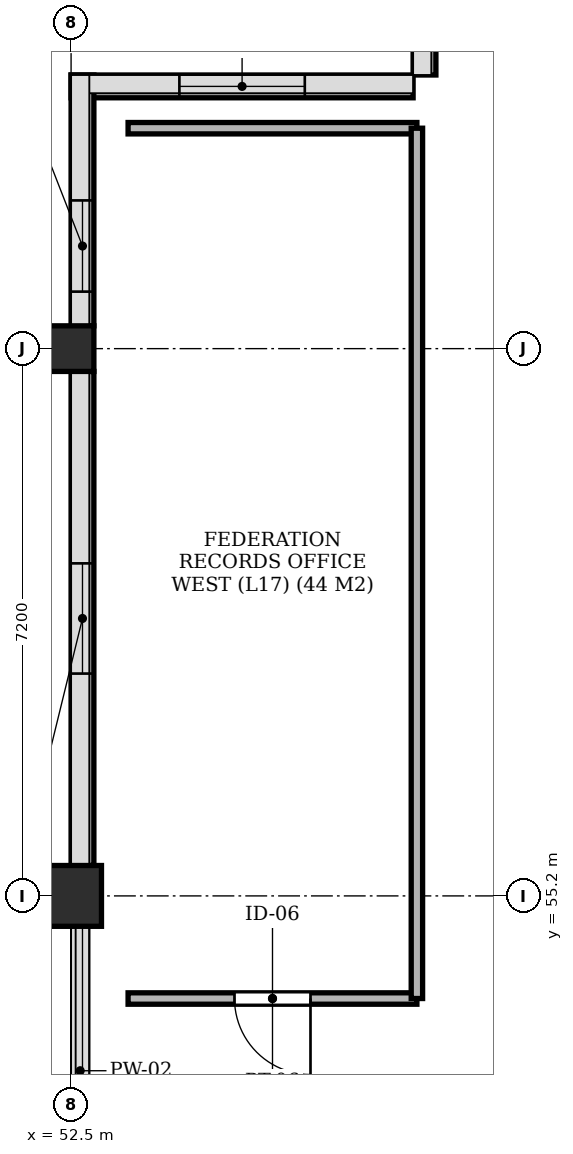
"""IFC4 building model, lengths in metres.
Left out: names, types, materials, properties, quantities, classifications, styles, units other than length and angle.
Written with IfcOpenShell. Run it as: python <this file> out.ifc"""

import sys

from ifc_helpers import new_model, si_unit, direction, frame, frame_2d, origin, origin_2d, place, context, subcontext, project, spatial, rectangle, extrude, element, fill, save


model = new_model("IFC4")
c1 = context("Model", 3, precision=1e-05, world=origin(), true_north=direction((0.0, 1.0)))
c2 = subcontext(c1, "Body", "Model", "MODEL_VIEW")
j1 = project(units=[si_unit("LENGTHUNIT", "METRE"), si_unit("PLANEANGLEUNIT", "RADIAN")], contexts=[c1])
p1 = place(None, origin())
s1 = spatial("IfcSite", under=j1, at=p1, CompositionType="ELEMENT")
p2 = place(p1, origin())
s2 = spatial("IfcBuilding", under=s1, at=p2, CompositionType="ELEMENT")
p3 = place(p2, frame((0.0, 0.0, 66.55)))
s3 = spatial("IfcBuildingStorey", under=s2, at=p3, CompositionType="ELEMENT", Elevation=66.55)
p4 = place(p3, frame((52.5, 55.2, -0.24), z_axis=(0.0, 0.0, 1.0), x_axis=(1.0, 0.0, 0.0)))
e1 = element("IfcColumn", 1, at=p4, inside=s3, PredefinedType="COLUMN", context=c2, shape_type="SweptSolid", body=[
    extrude(rectangle(XDim=0.8, YDim=0.8, at=origin_2d()), origin(), (0.0, 0.0, 1.0), 3.19),
])
p5 = place(p3, frame((52.5, 62.4, -0.24), z_axis=(0.0, 0.0, 1.0), x_axis=(1.0, 0.0, 0.0)))
e2 = element("IfcColumn", 2, at=p5, inside=s3, PredefinedType="COLUMN", context=c2, shape_type="SweptSolid", body=[
    extrude(rectangle(XDim=0.6, YDim=0.6, at=origin_2d()), origin(), (0.0, 0.0, 1.0), 3.19),
])
p6 = place(p3, frame((57.15, 69.6, 0.0), z_axis=(0.0, 0.0, 1.0), x_axis=(0.0, -1.0, 0.0)))
e3 = element("IfcWall", 3, at=p6, inside=s3, PredefinedType="SOLIDWALL", context=c2, shape_type="SweptSolid", body=[
    extrude(rectangle(XDim=3.6, YDim=0.3, at=frame_2d((1.8, 0.0))), origin(), (0.0, 0.0, 1.0), 2.53),
])
p7 = place(p3, frame((57.0, 65.85, 0.0), z_axis=(0.0, 0.0, 1.0), x_axis=(-1.0, 0.0, 0.0)))
e4 = element("IfcWall", 4, at=p7, inside=s3, PredefinedType="SOLIDWALL", context=c2, shape_type="SweptSolid", body=[
    extrude(rectangle(XDim=4.5, YDim=0.3, at=frame_2d((2.25, 0.0))), origin(), (0.0, 0.0, 1.0), 2.53),
])
p8 = place(p7, frame((1.425, 0.0, 0.62)))
e5 = element("IfcOpeningElement", 5, at=p8, cuts=e4, PredefinedType="OPENING", context=c2, shape_type="SweptSolid", body=[
    extrude(rectangle(XDim=1.65, YDim=1.81, at=frame_2d((0.825, 0.905))), frame((0.0, 0.162, 0.0), z_axis=(0.0, -1.0, 0.0), x_axis=(1.0, 0.0, 0.0)), (0.0, 0.0, 1.0), 0.324),
])
p9 = place(p3, frame((52.65, 66.0, 0.0), z_axis=(0.0, 0.0, 1.0), x_axis=(0.0, -1.0, 0.0)))
e6 = element("IfcWall", 6, at=p9, inside=s3, PredefinedType="SOLIDWALL", context=c2, shape_type="SweptSolid", body=[
    extrude(rectangle(XDim=3.3, YDim=0.3, at=frame_2d((1.65, 0.0))), origin(), (0.0, 0.0, 1.0), 2.53),
])
p10 = place(p9, frame((1.65, 0.0, 0.62)))
e7 = element("IfcOpeningElement", 7, at=p10, cuts=e6, PredefinedType="OPENING", context=c2, shape_type="SweptSolid", body=[
    extrude(rectangle(XDim=1.2, YDim=1.65, at=frame_2d((0.6, 0.825))), frame((0.0, 0.162, 0.0), z_axis=(0.0, -1.0, 0.0), x_axis=(1.0, 0.0, 0.0)), (0.0, 0.0, 1.0), 0.324),
])
p11 = place(p3, frame((52.65, 62.1, 0.0), z_axis=(0.0, 0.0, 1.0), x_axis=(0.0, -1.0, 0.0)))
e8 = element("IfcWall", 8, at=p11, inside=s3, PredefinedType="SOLIDWALL", context=c2, shape_type="SweptSolid", body=[
    extrude(rectangle(XDim=6.5, YDim=0.3, at=frame_2d((3.25, 0.0))), origin(), (0.0, 0.0, 1.0), 2.53),
])
p12 = place(p11, frame((2.525, 0.0, 0.62)))
e9 = element("IfcOpeningElement", 9, at=p12, cuts=e8, PredefinedType="OPENING", context=c2, shape_type="SweptSolid", body=[
    extrude(rectangle(XDim=1.45, YDim=1.81, at=frame_2d((0.725, 0.905))), frame((0.0, 0.162, 0.0), z_axis=(0.0, -1.0, 0.0), x_axis=(1.0, 0.0, 0.0)), (0.0, 0.0, 1.0), 0.324),
])
p13 = place(p3, frame((57.12, 69.6, 3.25), z_axis=(0.0, 0.0, 1.0), x_axis=(0.0, -1.0, 0.0)))
e10 = element("IfcWall", 10, at=p13, inside=s3, PredefinedType="PARAPET", context=c2, shape_type="SweptSolid", body=[
    extrude(rectangle(XDim=3.6, YDim=0.24, at=frame_2d((1.8, 0.0))), origin(), (0.0, 0.0, 1.0), 1.25),
])
p14 = place(p3, frame((57.0, 65.88, 3.25), z_axis=(0.0, 0.0, 1.0), x_axis=(-1.0, 0.0, 0.0)))
e11 = element("IfcWall", 11, at=p14, inside=s3, PredefinedType="PARAPET", context=c2, shape_type="SweptSolid", body=[
    extrude(rectangle(XDim=4.5, YDim=0.24, at=frame_2d((2.25, 0.0))), origin(), (0.0, 0.0, 1.0), 1.25),
])
p15 = place(p3, frame((52.62, 66.0, 3.25), z_axis=(0.0, 0.0, 1.0), x_axis=(0.0, -1.0, 0.0)))
e12 = element("IfcWall", 12, at=p15, inside=s3, PredefinedType="PARAPET", context=c2, shape_type="SweptSolid", body=[
    extrude(rectangle(XDim=26.2, YDim=0.24, at=frame_2d((13.1, 0.0))), origin(), (0.0, 0.0, 1.0), 1.25),
])
p16 = place(p3, frame((53.25, 53.85, 0.0), z_axis=(0.0, 0.0, 1.0), x_axis=(1.0, 0.0, 0.0)))
e13 = element("IfcWall", 13, at=p16, inside=s3, PredefinedType="PARTITIONING", context=c2, shape_type="SweptSolid", body=[
    extrude(rectangle(XDim=3.8, YDim=0.15, at=frame_2d((1.9, 0.0))), origin(), (0.0, 0.0, 1.0), 2.53),
])
p17 = place(p16, frame((1.4, 0.0, 0.0)))
e14 = element("IfcOpeningElement", 14, at=p17, cuts=e13, PredefinedType="OPENING", context=c2, shape_type="SweptSolid", body=[
    extrude(rectangle(XDim=1.0, YDim=2.15, at=frame_2d((0.5, 1.075))), frame((0.0, 0.087, 0.0), z_axis=(0.0, -1.0, 0.0), x_axis=(1.0, 0.0, 0.0)), (0.0, 0.0, 1.0), 0.174),
])
p18 = place(p3, frame((53.25, 65.3, 0.0), z_axis=(0.0, 0.0, 1.0), x_axis=(1.0, 0.0, 0.0)))
e15 = element("IfcWall", 15, at=p18, inside=s3, PredefinedType="PARTITIONING", context=c2, shape_type="SweptSolid", body=[
    extrude(rectangle(XDim=3.8, YDim=0.15, at=frame_2d((1.9, 0.0))), origin(), (0.0, 0.0, 1.0), 2.53),
])
p19 = place(p3, frame((57.05, 53.85, 0.0), z_axis=(0.0, 0.0, 1.0), x_axis=(0.0, 1.0, 0.0)))
e16 = element("IfcWall", 16, at=p19, inside=s3, PredefinedType="PARTITIONING", context=c2, shape_type="SweptSolid", body=[
    extrude(rectangle(XDim=11.45, YDim=0.15, at=frame_2d((5.725, 0.0))), origin(), (0.0, 0.0, 1.0), 2.53),
])
p20 = place(p8, origin())
e17 = element("IfcWindow", 17, at=p20, inside=s3, PartitioningType="SINGLE_PANEL", PredefinedType="WINDOW", context=c2, shape_type="SweptSolid", body=[
    extrude(rectangle(XDim=1.65, YDim=1.81, at=frame_2d((0.825, 0.905))), frame((0.0, 0.03, 0.0), z_axis=(0.0, -1.0, 0.0), x_axis=(1.0, 0.0, 0.0)), (0.0, 0.0, 1.0), 0.06),
])
fill(e5, e17)
p21 = place(p10, origin())
e18 = element("IfcWindow", 18, at=p21, inside=s3, PartitioningType="SINGLE_PANEL", PredefinedType="WINDOW", context=c2, shape_type="SweptSolid", body=[
    extrude(rectangle(XDim=1.2, YDim=1.65, at=frame_2d((0.6, 0.825))), frame((0.0, 0.03, 0.0), z_axis=(0.0, -1.0, 0.0), x_axis=(1.0, 0.0, 0.0)), (0.0, 0.0, 1.0), 0.06),
])
fill(e7, e18)
p22 = place(p12, origin())
e19 = element("IfcWindow", 19, at=p22, inside=s3, PartitioningType="SINGLE_PANEL", PredefinedType="WINDOW", context=c2, shape_type="SweptSolid", body=[
    extrude(rectangle(XDim=1.45, YDim=1.81, at=frame_2d((0.725, 0.905))), frame((0.0, 0.03, 0.0), z_axis=(0.0, -1.0, 0.0), x_axis=(1.0, 0.0, 0.0)), (0.0, 0.0, 1.0), 0.06),
])
fill(e9, e19)
p23 = place(p17, frame((1.0, 0.0, 0.0), z_axis=(0.0, 0.0, 1.0), x_axis=(-1.0, 0.0, 0.0)))
e20 = element("IfcDoor", 20, at=p23, inside=s3, OperationType="SINGLE_SWING_RIGHT", PredefinedType="DOOR", context=c2, shape_type="SweptSolid", body=[
    extrude(rectangle(XDim=1.0, YDim=2.15, at=frame_2d((0.5, 1.075))), frame((0.0, 0.025, 0.0), z_axis=(0.0, -1.0, 0.0), x_axis=(1.0, 0.0, 0.0)), (0.0, 0.0, 1.0), 0.05),
])
fill(e14, e20)
save(model, sys.argv[1])
